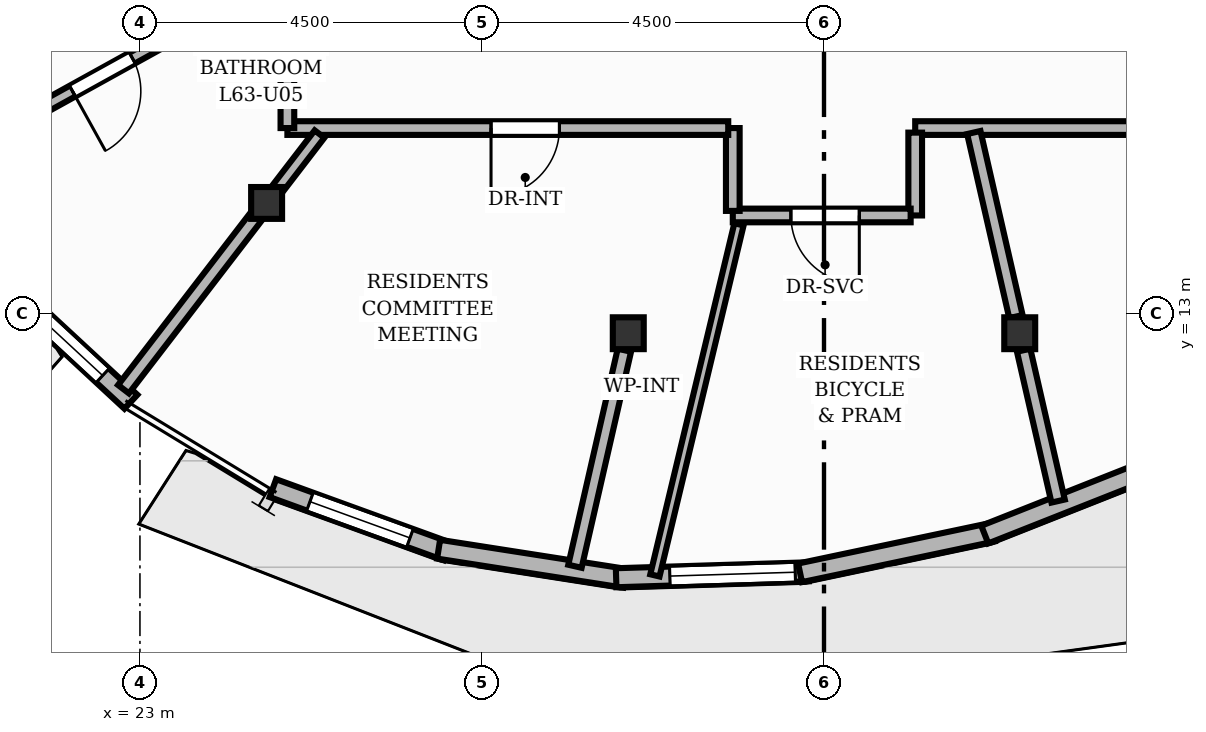
"""IFC4 building model, lengths in metres.
Left out: names, types, materials, properties, quantities, classifications, styles, units other than length and angle.
Written with IfcOpenShell. Run it as: python <this file> out.ifc"""

import sys

from ifc_helpers import new_model, si_unit, direction, frame, frame_2d, origin, origin_2d, place, context, subcontext, project, spatial, rectangle, i_section, extrude, element, fill, save


model = new_model("IFC4")
c1 = context("Model", 3, precision=1e-05, world=origin(), true_north=direction((0.0, 1.0)))
c2 = subcontext(c1, "Body", "Model", "MODEL_VIEW")
j1 = project(units=[si_unit("LENGTHUNIT", "METRE"), si_unit("PLANEANGLEUNIT", "RADIAN")], contexts=[c1])
p1 = place(None, origin())
s1 = spatial("IfcSite", under=j1, at=p1, CompositionType="ELEMENT")
p2 = place(p1, origin())
s2 = spatial("IfcBuilding", under=s1, at=p2, CompositionType="ELEMENT")
p3 = place(p2, frame((0.0, 0.0, 211.04)))
s3 = spatial("IfcBuildingStorey", under=s2, at=p3, CompositionType="ELEMENT", Elevation=211.04)
for number, where, z_axis, x_axis in (
    (1, (24.667, 14.455, 0.0), (0.0, 0.0, 1.0), (1.0, 0.0, 0.0)),
    (2, (29.425, 12.74, 0.0), (0.0, 0.0, 1.0), (1.0, 0.0, 0.0)),
    (3, (34.575, 12.74, 0.0), (0.0, 0.0, 1.0), (1.0, 0.0, 0.0)),
):
    element("IfcColumn", number, at=place(p3, frame(where, z_axis=z_axis, x_axis=x_axis)), inside=s3, PredefinedType="COLUMN", context=c2, shape_type="SweptSolid", body=[
        extrude(i_section(OverallWidth=0.407, OverallDepth=0.419, WebThickness=0.031, FlangeThickness=0.049, at=origin_2d()), origin(), (0.0, 0.0, 1.0), 3.2),
    ])
p4 = place(p3, frame((22.881, 11.839, 0.0), z_axis=(0.0, 0.0, 1.0), x_axis=(-0.733441361842, 0.679752726173, 0.0)))
e4 = element("IfcWall", 4, at=p4, inside=s3, PredefinedType="SOLIDWALL", context=c2, shape_type="SweptSolid", body=[
    extrude(rectangle(XDim=2.415, YDim=0.25, at=frame_2d((1.207, 0.0))), origin(), (0.0, 0.0, 1.0), 2.96),
])
p5 = place(p4, frame((0.507, 0.0, 0.85)))
e5 = element("IfcOpeningElement", 5, at=p5, cuts=e4, PredefinedType="OPENING", context=c2, shape_type="SweptSolid", body=[
    extrude(rectangle(XDim=1.4, YDim=1.55, at=frame_2d((0.7, 0.775))), frame((0.0, 0.135, 0.0), z_axis=(0.0, -1.0, 0.0), x_axis=(1.0, 0.0, 0.0)), (0.0, 0.0, 1.0), 0.27),
])
p6 = place(p3, frame((27.04, 9.87, 0.0), z_axis=(0.0, 0.0, 1.0), x_axis=(-0.939954186413, 0.341300640851, 0.0)))
e6 = element("IfcWall", 6, at=p6, inside=s3, PredefinedType="SOLIDWALL", context=c2, shape_type="SweptSolid", body=[
    extrude(rectangle(XDim=2.437, YDim=0.25, at=frame_2d((1.219, 0.0))), origin(), (0.0, 0.0, 1.0), 2.96),
])
p7 = place(p6, frame((0.518, 0.0, 0.85)))
e7 = element("IfcOpeningElement", 7, at=p7, cuts=e6, PredefinedType="OPENING", context=c2, shape_type="SweptSolid", body=[
    extrude(rectangle(XDim=1.4, YDim=1.55, at=frame_2d((0.7, 0.775))), frame((0.0, 0.135, 0.0), z_axis=(0.0, -1.0, 0.0), x_axis=(1.0, 0.0, 0.0)), (0.0, 0.0, 1.0), 0.27),
])
p8 = place(p3, frame((29.378, 9.516, 0.0), z_axis=(0.0, 0.0, 1.0), x_axis=(-0.988040195026, 0.154196540209, 0.0)))
e8 = element("IfcWall", 8, at=p8, inside=s3, PredefinedType="SOLIDWALL", context=c2, shape_type="SweptSolid", body=[
    extrude(rectangle(XDim=2.478, YDim=0.25, at=frame_2d((1.239, 0.0))), origin(), (0.0, 0.0, 1.0), 2.96),
])
p9 = place(p3, frame((31.796, 9.601, 0.0), z_axis=(0.0, 0.0, 1.0), x_axis=(-0.999523857129, -0.030855453818, 0.0)))
e9 = element("IfcWall", 9, at=p9, inside=s3, PredefinedType="SOLIDWALL", context=c2, shape_type="SweptSolid", body=[
    extrude(rectangle(XDim=2.532, YDim=0.25, at=frame_2d((1.266, 0.0))), origin(), (0.0, 0.0, 1.0), 2.96),
])
p10 = place(p9, frame((0.175, 0.0, 0.85)))
e10 = element("IfcOpeningElement", 10, at=p10, cuts=e9, PredefinedType="OPENING", context=c2, shape_type="SweptSolid", body=[
    extrude(rectangle(XDim=1.65, YDim=1.55, at=frame_2d((0.825, 0.775))), frame((0.0, 0.135, 0.0), z_axis=(0.0, -1.0, 0.0), x_axis=(1.0, 0.0, 0.0)), (0.0, 0.0, 1.0), 0.27),
])
p11 = place(p3, frame((34.221, 10.123, 0.0), z_axis=(0.0, 0.0, 1.0), x_axis=(-0.978434707222, -0.206556345104, 0.0)))
e11 = element("IfcWall", 11, at=p11, inside=s3, PredefinedType="SOLIDWALL", context=c2, shape_type="SweptSolid", body=[
    extrude(rectangle(XDim=2.592, YDim=0.25, at=frame_2d((1.296, 0.0))), origin(), (0.0, 0.0, 1.0), 2.96),
])
p12 = place(p3, frame((36.58, 11.067, 0.0), z_axis=(0.0, 0.0, 1.0), x_axis=(-0.929861098324, -0.36791077427, 0.0)))
e12 = element("IfcWall", 12, at=p12, inside=s3, PredefinedType="SOLIDWALL", context=c2, shape_type="SweptSolid", body=[
    extrude(rectangle(XDim=2.651, YDim=0.25, at=frame_2d((1.326, 0.0))), origin(), (0.0, 0.0, 1.0), 2.96),
])
p13 = place(p3, frame((24.527, 14.273, 0.0), z_axis=(0.0, 0.0, 1.0), x_axis=(-0.609244614772, -0.792982344931, 0.0)))
e13 = element("IfcWall", 13, at=p13, inside=s3, PredefinedType="PARTITIONING", context=c2, shape_type="SweptSolid", body=[
    extrude(rectangle(XDim=2.861, YDim=0.18, at=frame_2d((1.43, 0.0))), origin(), (0.0, 0.0, 1.0), 2.403),
])
p14 = place(p3, frame((29.374, 12.517, 0.0), z_axis=(0.0, 0.0, 1.0), x_axis=(-0.222945280676, -0.974830960641, 0.0)))
e14 = element("IfcWall", 14, at=p14, inside=s3, PredefinedType="PARTITIONING", context=c2, shape_type="SweptSolid", body=[
    extrude(rectangle(XDim=2.916, YDim=0.18, at=frame_2d((1.458, 0.0))), origin(), (0.0, 0.0, 1.0), 2.403),
])
p15 = place(p3, frame((34.626, 12.517, 0.0), z_axis=(0.0, 0.0, 1.0), x_axis=(0.222932254148, -0.974833939736, 0.0)))
e15 = element("IfcWall", 15, at=p15, inside=s3, PredefinedType="PARTITIONING", context=c2, shape_type="SweptSolid", body=[
    extrude(rectangle(XDim=2.036, YDim=0.18, at=frame_2d((1.018, 0.0))), origin(), (0.0, 0.0, 1.0), 2.403),
])
p16 = place(p3, frame((39.06, 15.44, 0.0), z_axis=(0.0, 0.0, 1.0), x_axis=(-1.0, 0.0, 0.0)))
e16 = element("IfcWall", 16, at=p16, inside=s3, PredefinedType="PARTITIONING", context=c2, shape_type="SweptSolid", body=[
    extrude(rectangle(XDim=5.86, YDim=0.18, at=frame_2d((2.93, 0.0))), origin(), (0.0, 0.0, 1.0), 2.955),
])
p17 = place(p3, frame((33.2, 15.38, 0.0), z_axis=(0.0, 0.0, 1.0), x_axis=(0.0, -1.0, 0.0)))
e17 = element("IfcWall", 17, at=p17, inside=s3, PredefinedType="PARTITIONING", context=c2, shape_type="SweptSolid", body=[
    extrude(rectangle(XDim=1.09, YDim=0.18, at=frame_2d((0.545, 0.0))), origin(), (0.0, 0.0, 1.0), 2.955),
])
p18 = place(p3, frame((33.14, 14.29, 0.0), z_axis=(0.0, 0.0, 1.0), x_axis=(-1.0, 0.0, 0.0)))
e18 = element("IfcWall", 18, at=p18, inside=s3, PredefinedType="PARTITIONING", context=c2, shape_type="SweptSolid", body=[
    extrude(rectangle(XDim=2.34, YDim=0.18, at=frame_2d((1.17, 0.0))), origin(), (0.0, 0.0, 1.0), 2.955),
])
p19 = place(p18, frame((0.676, 0.0, 0.0)))
e19 = element("IfcOpeningElement", 19, at=p19, cuts=e18, PredefinedType="OPENING", context=c2, shape_type="SweptSolid", body=[
    extrude(rectangle(XDim=0.9, YDim=2.1, at=frame_2d((0.45, 1.05))), frame((0.0, 0.1, 0.0), z_axis=(0.0, -1.0, 0.0), x_axis=(1.0, 0.0, 0.0)), (0.0, 0.0, 1.0), 0.2),
])
p20 = place(p3, frame((30.8, 14.35, 0.0), z_axis=(0.0, 0.0, 1.0), x_axis=(0.0, 1.0, 0.0)))
e20 = element("IfcWall", 20, at=p20, inside=s3, PredefinedType="PARTITIONING", context=c2, shape_type="SweptSolid", body=[
    extrude(rectangle(XDim=1.09, YDim=0.18, at=frame_2d((0.545, 0.0))), origin(), (0.0, 0.0, 1.0), 2.955),
])
p21 = place(p3, frame((30.74, 15.44, 0.0), z_axis=(0.0, 0.0, 1.0), x_axis=(-1.0, 0.0, 0.0)))
e21 = element("IfcWall", 21, at=p21, inside=s3, PredefinedType="PARTITIONING", context=c2, shape_type="SweptSolid", body=[
    extrude(rectangle(XDim=5.8, YDim=0.18, at=frame_2d((2.9, 0.0))), origin(), (0.0, 0.0, 1.0), 2.955),
])
p22 = place(p21, frame((2.221, 0.0, 0.0)))
e22 = element("IfcOpeningElement", 22, at=p22, cuts=e21, PredefinedType="OPENING", context=c2, shape_type="SweptSolid", body=[
    extrude(rectangle(XDim=0.9, YDim=2.1, at=frame_2d((0.45, 1.05))), frame((0.0, 0.1, 0.0), z_axis=(0.0, -1.0, 0.0), x_axis=(1.0, 0.0, 0.0)), (0.0, 0.0, 1.0), 0.2),
])
p23 = place(p3, frame((24.94, 15.44, 0.0), z_axis=(0.0, 0.0, 1.0), x_axis=(0.0, 1.0, 0.0)))
e23 = element("IfcWall", 23, at=p23, inside=s3, PredefinedType="PARTITIONING", context=c2, shape_type="SweptSolid", body=[
    extrude(rectangle(XDim=17.12, YDim=0.18, at=frame_2d((8.56, 0.0))), origin(), (0.0, 0.0, 1.0), 2.955),
])
p24 = place(p23, frame((4.404, 0.0, 0.0)))
e24 = element("IfcOpeningElement", 24, at=p24, cuts=e23, PredefinedType="OPENING", context=c2, shape_type="SweptSolid", body=[
    extrude(rectangle(XDim=1.05, YDim=2.15, at=frame_2d((0.525, 1.075))), frame((0.0, 0.1, 0.0), z_axis=(0.0, -1.0, 0.0), x_axis=(1.0, 0.0, 0.0)), (0.0, 0.0, 1.0), 0.2),
])
p25 = place(p3, frame((29.775, 9.554, 0.0), z_axis=(0.0, 0.0, 1.0), x_axis=(0.232836379221, 0.972515923012, 0.0)))
e25 = element("IfcWall", 25, at=p25, inside=s3, PredefinedType="PARTITIONING", context=c2, shape_type="SweptSolid", body=[
    extrude(rectangle(XDim=4.75, YDim=0.125, at=frame_2d((2.375, 0.0))), origin(), (0.0, 0.0, 1.0), 2.955),
])
p26 = place(p3, frame((33.971, 15.382, 0.0), z_axis=(0.0, 0.0, 1.0), x_axis=(0.222950196428, -0.974829836388, 0.0)))
e26 = element("IfcWall", 26, at=p26, inside=s3, PredefinedType="PARTITIONING", context=c2, shape_type="SweptSolid", body=[
    extrude(rectangle(XDim=2.485, YDim=0.18, at=frame_2d((1.242, 0.0))), origin(), (0.0, 0.0, 1.0), 2.403),
])
p27 = place(p3, frame((24.806, 14.636, 0.0), z_axis=(0.0, 0.0, 1.0), x_axis=(0.609284308489, 0.792951846854, 0.0)))
e27 = element("IfcWall", 27, at=p27, inside=s3, PredefinedType="PLUMBINGWALL", context=c2, shape_type="SweptSolid", body=[
    extrude(rectangle(XDim=0.913, YDim=0.16, at=frame_2d((0.457, 0.0))), origin(), (0.0, 0.0, 1.0), 2.403),
])
p28 = place(p3, frame((24.853, 17.443, 0.0), z_axis=(0.0, 0.0, 1.0), x_axis=(-0.874969642777, -0.484177781624, 0.0)))
e28 = element("IfcWall", 28, at=p28, inside=s3, PredefinedType="PLUMBINGWALL", context=c2, shape_type="SweptSolid", body=[
    extrude(rectangle(XDim=5.365, YDim=0.16, at=frame_2d((2.682, 0.0))), origin(), (0.0, 0.0, 1.0), 2.955),
])
p29 = place(p28, frame((2.232, 0.0, 0.0)))
e29 = element("IfcOpeningElement", 29, at=p29, cuts=e28, PredefinedType="OPENING", context=c2, shape_type="SweptSolid", body=[
    extrude(rectangle(XDim=0.9, YDim=2.1, at=frame_2d((0.45, 1.05))), frame((0.0, 0.09, 0.0), z_axis=(0.0, -1.0, 0.0), x_axis=(1.0, 0.0, 0.0)), (0.0, 0.0, 1.0), 0.18),
])
p30 = place(p5, origin())
e30 = element("IfcWindow", 30, at=p30, inside=s3, PartitioningType="SINGLE_PANEL", PredefinedType="WINDOW", context=c2, shape_type="SweptSolid", body=[
    extrude(rectangle(XDim=1.4, YDim=1.55, at=frame_2d((0.7, 0.775))), frame((0.0, 0.03, 0.0), z_axis=(0.0, -1.0, 0.0), x_axis=(1.0, 0.0, 0.0)), (0.0, 0.0, 1.0), 0.06),
])
fill(e5, e30)
p31 = place(p7, origin())
e31 = element("IfcWindow", 31, at=p31, inside=s3, PartitioningType="SINGLE_PANEL", PredefinedType="WINDOW", context=c2, shape_type="SweptSolid", body=[
    extrude(rectangle(XDim=1.4, YDim=1.55, at=frame_2d((0.7, 0.775))), frame((0.0, 0.03, 0.0), z_axis=(0.0, -1.0, 0.0), x_axis=(1.0, 0.0, 0.0)), (0.0, 0.0, 1.0), 0.06),
])
fill(e7, e31)
p32 = place(p10, origin())
e32 = element("IfcWindow", 32, at=p32, inside=s3, PartitioningType="SINGLE_PANEL", PredefinedType="WINDOW", context=c2, shape_type="SweptSolid", body=[
    extrude(rectangle(XDim=1.65, YDim=1.55, at=frame_2d((0.825, 0.775))), frame((0.0, 0.03, 0.0), z_axis=(0.0, -1.0, 0.0), x_axis=(1.0, 0.0, 0.0)), (0.0, 0.0, 1.0), 0.06),
])
fill(e10, e32)
p33 = place(p19, origin())
e33 = element("IfcDoor", 33, at=p33, inside=s3, OperationType="SINGLE_SWING_LEFT", PredefinedType="DOOR", context=c2, shape_type="SweptSolid", body=[
    extrude(rectangle(XDim=0.9, YDim=2.1, at=frame_2d((0.45, 1.05))), frame((0.0, 0.025, 0.0), z_axis=(0.0, -1.0, 0.0), x_axis=(1.0, 0.0, 0.0)), (0.0, 0.0, 1.0), 0.05),
])
fill(e19, e33)
p34 = place(p22, origin())
e34 = element("IfcDoor", 34, at=p34, inside=s3, OperationType="SINGLE_SWING_RIGHT", PredefinedType="DOOR", context=c2, shape_type="SweptSolid", body=[
    extrude(rectangle(XDim=0.9, YDim=2.1, at=frame_2d((0.45, 1.05))), frame((0.0, 0.025, 0.0), z_axis=(0.0, -1.0, 0.0), x_axis=(1.0, 0.0, 0.0)), (0.0, 0.0, 1.0), 0.05),
])
fill(e22, e34)
p35 = place(p29, origin())
e35 = element("IfcDoor", 35, at=p35, inside=s3, OperationType="SINGLE_SWING_RIGHT", PredefinedType="DOOR", context=c2, shape_type="SweptSolid", body=[
    extrude(rectangle(XDim=0.9, YDim=2.1, at=frame_2d((0.45, 1.05))), frame((0.0, 0.025, 0.0), z_axis=(0.0, -1.0, 0.0), x_axis=(1.0, 0.0, 0.0)), (0.0, 0.0, 1.0), 0.05),
])
fill(e29, e35)
save(model, sys.argv[1])
